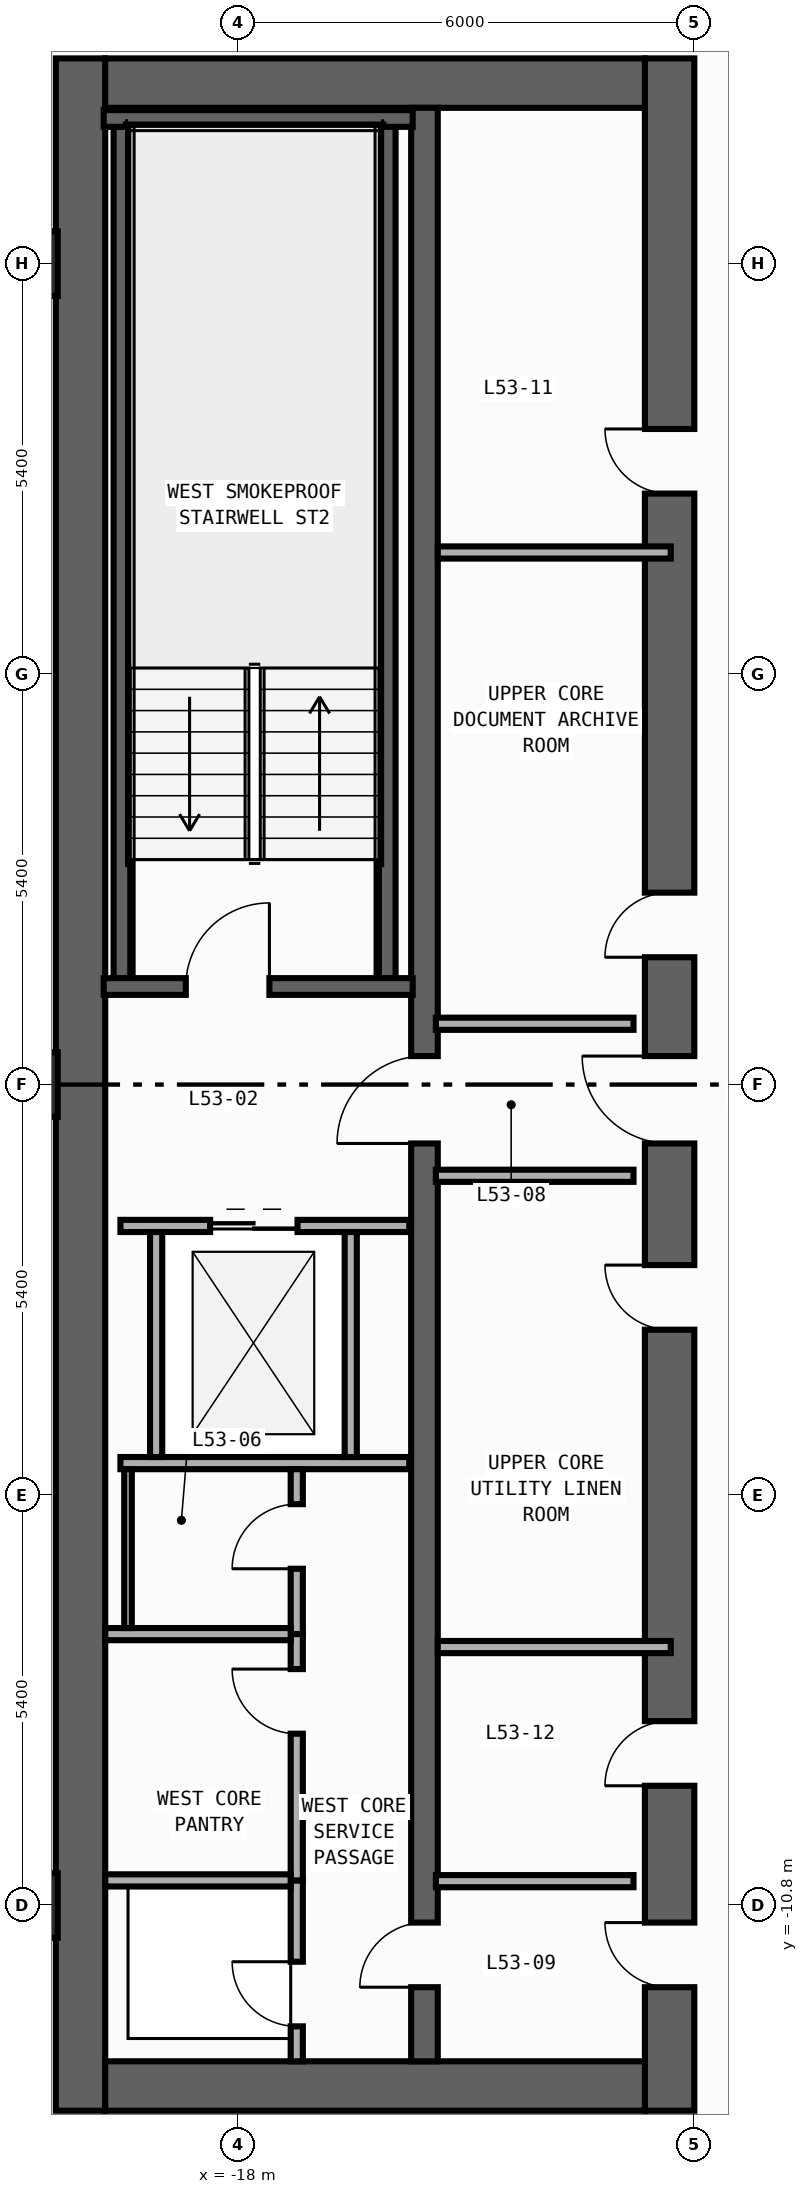
"""IFC4 building model, lengths in metres.
Left out: names, types, materials, properties, quantities, classifications, styles, units other than length and angle.
Written with IfcOpenShell. Run it as: python <this file> out.ifc"""

import sys

from ifc_helpers import new_model, si_unit, direction, frame, frame_2d, origin, origin_2d, place, context, subcontext, project, spatial, rectangle, extrude, element, fill, save


model = new_model("IFC4")
c1 = context("Model", 3, precision=1e-05, world=origin(), true_north=direction((0.0, 1.0)))
c2 = subcontext(c1, "Body", "Model", "MODEL_VIEW")
j1 = project(units=[si_unit("LENGTHUNIT", "METRE"), si_unit("PLANEANGLEUNIT", "RADIAN")], contexts=[c1])
p1 = place(None, origin())
s1 = spatial("IfcSite", under=j1, at=p1, CompositionType="ELEMENT")
p2 = place(p1, origin())
s2 = spatial("IfcBuilding", under=s1, at=p2, CompositionType="ELEMENT")
p3 = place(p2, frame((0.0, 0.0, 229.6)))
s3 = spatial("IfcBuildingStorey", under=s2, at=p3, CompositionType="ELEMENT", Elevation=229.6)
p4 = place(p3, frame((-20.075, -13.5, 0.0), z_axis=(0.0, 0.0, 1.0), x_axis=(0.0, 1.0, 0.0)))
e1 = element("IfcWall", 1, at=p4, inside=s3, PredefinedType="SHEAR", context=c2, shape_type="SweptSolid", body=[
    extrude(rectangle(XDim=27.0, YDim=0.65, at=frame_2d((13.5, 0.0))), origin(), (0.0, 0.0, 1.0), 3.34),
])
p5 = place(p3, frame((-12.325, -13.5, 0.0), z_axis=(0.0, 0.0, 1.0), x_axis=(0.0, 1.0, 0.0)))
e2 = element("IfcWall", 2, at=p5, inside=s3, PredefinedType="SHEAR", context=c2, shape_type="SweptSolid", body=[
    extrude(rectangle(XDim=27.0, YDim=0.65, at=frame_2d((13.5, 0.0))), origin(), (0.0, 0.0, 1.0), 3.34),
])
p6 = place(p5, frame((15.175, 0.0, 0.0)))
e3 = element("IfcOpeningElement", 3, at=p6, cuts=e2, PredefinedType="OPENING", context=c2, shape_type="SweptSolid", body=[
    extrude(rectangle(XDim=0.85, YDim=2.1, at=frame_2d((0.425, 1.05))), frame((0.0, 0.335, 0.0), z_axis=(0.0, -1.0, 0.0), x_axis=(1.0, 0.0, 0.0)), (0.0, 0.0, 1.0), 0.67),
])
p7 = place(p5, frame((21.275, 0.0, 0.0)))
e4 = element("IfcOpeningElement", 4, at=p7, cuts=e2, PredefinedType="OPENING", context=c2, shape_type="SweptSolid", body=[
    extrude(rectangle(XDim=0.85, YDim=2.1, at=frame_2d((0.425, 1.05))), frame((0.0, 0.335, 0.0), z_axis=(0.0, -1.0, 0.0), x_axis=(1.0, 0.0, 0.0)), (0.0, 0.0, 1.0), 0.67),
])
p8 = place(p5, frame((4.275, 0.0, 0.0)))
e5 = element("IfcOpeningElement", 5, at=p8, cuts=e2, PredefinedType="OPENING", context=c2, shape_type="SweptSolid", body=[
    extrude(rectangle(XDim=0.85, YDim=2.1, at=frame_2d((0.425, 1.05))), frame((0.0, 0.335, 0.0), z_axis=(0.0, -1.0, 0.0), x_axis=(1.0, 0.0, 0.0)), (0.0, 0.0, 1.0), 0.67),
])
p9 = place(p5, frame((10.275, 0.0, 0.0)))
e6 = element("IfcOpeningElement", 6, at=p9, cuts=e2, PredefinedType="OPENING", context=c2, shape_type="SweptSolid", body=[
    extrude(rectangle(XDim=0.85, YDim=2.1, at=frame_2d((0.425, 1.05))), frame((0.0, 0.335, 0.0), z_axis=(0.0, -1.0, 0.0), x_axis=(1.0, 0.0, 0.0)), (0.0, 0.0, 1.0), 0.67),
])
p10 = place(p5, frame((12.725, 0.0, 0.0)))
e7 = element("IfcOpeningElement", 7, at=p10, cuts=e2, PredefinedType="OPENING", context=c2, shape_type="SweptSolid", body=[
    extrude(rectangle(XDim=1.15, YDim=2.2, at=frame_2d((0.575, 1.1))), frame((0.0, 0.335, 0.0), z_axis=(0.0, -1.0, 0.0), x_axis=(1.0, 0.0, 0.0)), (0.0, 0.0, 1.0), 0.67),
])
p11 = place(p5, frame((1.625, 0.0, 0.0)))
e8 = element("IfcOpeningElement", 8, at=p11, cuts=e2, PredefinedType="OPENING", context=c2, shape_type="SweptSolid", body=[
    extrude(rectangle(XDim=0.85, YDim=2.1, at=frame_2d((0.425, 1.05))), frame((0.0, 0.335, 0.0), z_axis=(0.0, -1.0, 0.0), x_axis=(1.0, 0.0, 0.0)), (0.0, 0.0, 1.0), 0.67),
])
for number, where, z_axis, x_axis in (
    (9, (-19.75, -13.175, 0.0), (0.0, 0.0, 1.0), (1.0, 0.0, 0.0)),
    (10, (-19.75, 13.175, 0.0), (0.0, 0.0, 1.0), (1.0, 0.0, 0.0)),
):
    element("IfcWall", number, at=place(p3, frame(where, z_axis=z_axis, x_axis=x_axis)), inside=s3, PredefinedType="SHEAR", context=c2, shape_type="SweptSolid", body=[
        extrude(rectangle(XDim=7.1, YDim=0.65, at=frame_2d((3.55, 0.0))), origin(), (0.0, 0.0, 1.0), 3.34),
    ])
p12 = place(p3, frame((-15.55, -12.85, 0.0), z_axis=(0.0, 0.0, 1.0), x_axis=(0.0, 1.0, 0.0)))
e11 = element("IfcWall", 11, at=p12, inside=s3, PredefinedType="SHEAR", context=c2, shape_type="SweptSolid", body=[
    extrude(rectangle(XDim=25.7, YDim=0.35, at=frame_2d((12.85, 0.0))), origin(), (0.0, 0.0, 1.0), 3.34),
])
p13 = place(p12, frame((12.075, 0.0, 0.0)))
e12 = element("IfcOpeningElement", 12, at=p13, cuts=e11, PredefinedType="OPENING", context=c2, shape_type="SweptSolid", body=[
    extrude(rectangle(XDim=1.15, YDim=2.2, at=frame_2d((0.575, 1.1))), frame((0.0, 0.185, 0.0), z_axis=(0.0, -1.0, 0.0), x_axis=(1.0, 0.0, 0.0)), (0.0, 0.0, 1.0), 0.37),
])
p14 = place(p12, frame((0.975, 0.0, 0.0)))
e13 = element("IfcOpeningElement", 13, at=p14, cuts=e11, PredefinedType="OPENING", context=c2, shape_type="SweptSolid", body=[
    extrude(rectangle(XDim=0.85, YDim=2.1, at=frame_2d((0.425, 1.05))), frame((0.0, 0.185, 0.0), z_axis=(0.0, -1.0, 0.0), x_axis=(1.0, 0.0, 0.0)), (0.0, 0.0, 1.0), 0.37),
])
for number, where, z_axis, x_axis in (
    (14, (-16.04, 1.29, 0.0), (0.0, 0.0, 1.0), (0.0, 1.0, 0.0)),
    (15, (-19.53, 1.29, 0.0), (0.0, 0.0, 1.0), (0.0, 1.0, 0.0)),
):
    element("IfcWall", number, at=place(p3, frame(where, z_axis=z_axis, x_axis=x_axis)), inside=s3, PredefinedType="SHEAR", context=c2, shape_type="SweptSolid", body=[
        extrude(rectangle(XDim=11.42, YDim=0.22, at=frame_2d((5.71, 0.0))), origin(), (0.0, 0.0, 1.0), 3.34),
    ])
p15 = place(p3, frame((-19.77, 12.71, 0.0), z_axis=(0.0, 0.0, 1.0), x_axis=(1.0, 0.0, 0.0)))
e16 = element("IfcWall", 16, at=p15, inside=s3, PredefinedType="SHEAR", context=c2, shape_type="SweptSolid", body=[
    extrude(rectangle(XDim=4.065, YDim=0.22, at=frame_2d((2.032, 0.0))), origin(), (0.0, 0.0, 1.0), 3.34),
])
p16 = place(p3, frame((-19.77, 1.29, 0.0), z_axis=(0.0, 0.0, 1.0), x_axis=(1.0, 0.0, 0.0)))
e17 = element("IfcWall", 17, at=p16, inside=s3, PredefinedType="SHEAR", context=c2, shape_type="SweptSolid", body=[
    extrude(rectangle(XDim=4.065, YDim=0.22, at=frame_2d((2.032, 0.0))), origin(), (0.0, 0.0, 1.0), 3.34),
])
p17 = place(p16, frame((1.08, 0.0, 0.0)))
e18 = element("IfcOpeningElement", 18, at=p17, cuts=e17, PredefinedType="OPENING", context=c2, shape_type="SweptSolid", body=[
    extrude(rectangle(XDim=1.1, YDim=2.2, at=frame_2d((0.55, 1.1))), frame((0.0, 0.12, 0.0), z_axis=(0.0, -1.0, 0.0), x_axis=(1.0, 0.0, 0.0)), (0.0, 0.0, 1.0), 0.24),
])
for number, where, z_axis, x_axis in (
    (19, (-20.8, -10.8, 0.0), (0.0, 0.0, 1.0), (1.0, 0.0, 0.0)),
    (20, (-20.8, 0.0, 0.0), (0.0, 0.0, 1.0), (1.0, 0.0, 0.0)),
    (21, (-20.8, 10.8, 0.0), (0.0, 0.0, 1.0), (1.0, 0.0, 0.0)),
):
    element("IfcColumn", number, at=place(p3, frame(where, z_axis=z_axis, x_axis=x_axis)), inside=s3, PredefinedType="COLUMN", context=c2, shape_type="SweptSolid", body=[
        extrude(rectangle(XDim=0.85, YDim=0.85, at=origin_2d()), origin(), (0.0, 0.0, 1.0), 3.6),
    ])
p18 = place(p3, frame((-19.55, -1.86, 0.0), z_axis=(0.0, 0.0, 1.0), x_axis=(1.0, 0.0, 0.0)))
e22 = element("IfcWall", 22, at=p18, inside=s3, PredefinedType="STANDARD", context=c2, shape_type="SweptSolid", body=[
    extrude(rectangle(XDim=3.8, YDim=0.16, at=frame_2d((1.9, 0.0))), origin(), (0.0, 0.0, 1.0), 3.34),
])
p19 = place(p18, frame((1.18, 0.0, 0.0)))
e23 = element("IfcOpeningElement", 23, at=p19, cuts=e22, PredefinedType="OPENING", context=c2, shape_type="SweptSolid", body=[
    extrude(rectangle(XDim=1.15, YDim=2.2, at=frame_2d((0.575, 1.1))), frame((0.0, 0.09, 0.0), z_axis=(0.0, -1.0, 0.0), x_axis=(1.0, 0.0, 0.0)), (0.0, 0.0, 1.0), 0.18),
])
p20 = place(p3, frame((-19.55, -4.98, 0.0), z_axis=(0.0, 0.0, 1.0), x_axis=(1.0, 0.0, 0.0)))
e24 = element("IfcWall", 24, at=p20, inside=s3, PredefinedType="STANDARD", context=c2, shape_type="SweptSolid", body=[
    extrude(rectangle(XDim=3.8, YDim=0.16, at=frame_2d((1.9, 0.0))), origin(), (0.0, 0.0, 1.0), 3.34),
])
for number, where, z_axis, x_axis in (
    (25, (-19.08, -4.9, 0.0), (0.0, 0.0, 1.0), (0.0, 1.0, 0.0)),
    (26, (-16.52, -4.9, 0.0), (0.0, 0.0, 1.0), (0.0, 1.0, 0.0)),
):
    element("IfcWall", number, at=place(p3, frame(where, z_axis=z_axis, x_axis=x_axis)), inside=s3, PredefinedType="STANDARD", context=c2, shape_type="SweptSolid", body=[
        extrude(rectangle(XDim=2.96, YDim=0.16, at=frame_2d((1.48, 0.0))), origin(), (0.0, 0.0, 1.0), 3.34),
    ])
for number, where, z_axis, x_axis in (
    (27, (-15.4, 0.8, 0.0), (0.0, 0.0, 1.0), (1.0, 0.0, 0.0)),
    (28, (-15.4, -1.2, 0.0), (0.0, 0.0, 1.0), (1.0, 0.0, 0.0)),
    (29, (-15.4, -10.48, 0.0), (0.0, 0.0, 1.0), (1.0, 0.0, 0.0)),
):
    element("IfcWall", number, at=place(p3, frame(where, z_axis=z_axis, x_axis=x_axis)), inside=s3, PredefinedType="STANDARD", context=c2, shape_type="SweptSolid", body=[
        extrude(rectangle(XDim=2.6, YDim=0.16, at=frame_2d((1.3, 0.0))), origin(), (0.0, 0.0, 1.0), 3.34),
    ])
p21 = place(p3, frame((-17.23, -12.85, 0.0), z_axis=(0.0, 0.0, 1.0), x_axis=(0.0, 1.0, 0.0)))
e30 = element("IfcWall", 30, at=p21, inside=s3, PredefinedType="PARTITIONING", context=c2, shape_type="SweptSolid", body=[
    extrude(rectangle(XDim=2.38, YDim=0.16, at=frame_2d((1.19, 0.0))), origin(), (0.0, 0.0, 1.0), 3.34),
])
p22 = place(p21, frame((0.46, 0.0, 0.0)))
e31 = element("IfcOpeningElement", 31, at=p22, cuts=e30, PredefinedType="OPENING", context=c2, shape_type="SweptSolid", body=[
    extrude(rectangle(XDim=0.85, YDim=2.1, at=frame_2d((0.425, 1.05))), frame((0.0, 0.09, 0.0), z_axis=(0.0, -1.0, 0.0), x_axis=(1.0, 0.0, 0.0)), (0.0, 0.0, 1.0), 0.18),
])
p23 = place(p3, frame((-17.23, -7.23, 0.0), z_axis=(0.0, 0.0, 1.0), x_axis=(0.0, 1.0, 0.0)))
e32 = element("IfcWall", 32, at=p23, inside=s3, PredefinedType="PARTITIONING", context=c2, shape_type="SweptSolid", body=[
    extrude(rectangle(XDim=2.17, YDim=0.16, at=frame_2d((1.085, 0.0))), origin(), (0.0, 0.0, 1.0), 3.34),
])
p24 = place(p23, frame((0.86, 0.0, 0.0)))
e33 = element("IfcOpeningElement", 33, at=p24, cuts=e32, PredefinedType="OPENING", context=c2, shape_type="SweptSolid", body=[
    extrude(rectangle(XDim=0.85, YDim=2.1, at=frame_2d((0.425, 1.05))), frame((0.0, 0.09, 0.0), z_axis=(0.0, -1.0, 0.0), x_axis=(1.0, 0.0, 0.0)), (0.0, 0.0, 1.0), 0.18),
])
p25 = place(p3, frame((-17.23, -10.47, 0.0), z_axis=(0.0, 0.0, 1.0), x_axis=(0.0, 1.0, 0.0)))
e34 = element("IfcWall", 34, at=p25, inside=s3, PredefinedType="PARTITIONING", context=c2, shape_type="SweptSolid", body=[
    extrude(rectangle(XDim=3.24, YDim=0.16, at=frame_2d((1.62, 0.0))), origin(), (0.0, 0.0, 1.0), 3.34),
])
p26 = place(p25, frame((1.93, 0.0, 0.0)))
e35 = element("IfcOpeningElement", 35, at=p26, cuts=e34, PredefinedType="OPENING", context=c2, shape_type="SweptSolid", body=[
    extrude(rectangle(XDim=0.85, YDim=2.1, at=frame_2d((0.425, 1.05))), frame((0.0, 0.09, 0.0), z_axis=(0.0, -1.0, 0.0), x_axis=(1.0, 0.0, 0.0)), (0.0, 0.0, 1.0), 0.18),
])
for number, where, z_axis, x_axis in (
    (36, (-19.75, -10.47, 0.0), (0.0, 0.0, 1.0), (1.0, 0.0, 0.0)),
    (37, (-19.75, -7.23, 0.0), (0.0, 0.0, 1.0), (1.0, 0.0, 0.0)),
):
    element("IfcWall", number, at=place(p3, frame(where, z_axis=z_axis, x_axis=x_axis)), inside=s3, PredefinedType="PARTITIONING", context=c2, shape_type="SweptSolid", body=[
        extrude(rectangle(XDim=2.44, YDim=0.16, at=frame_2d((1.22, 0.0))), origin(), (0.0, 0.0, 1.0), 3.34),
    ])
for number, where, z_axis, x_axis in (
    (38, (-15.375, 7.0, 0.0), (0.0, 0.0, 1.0), (1.0, 0.0, 0.0)),
    (39, (-15.375, -7.4, 0.0), (0.0, 0.0, 1.0), (1.0, 0.0, 0.0)),
):
    element("IfcWall", number, at=place(p3, frame(where, z_axis=z_axis, x_axis=x_axis)), inside=s3, PredefinedType="PARTITIONING", context=c2, shape_type="SweptSolid", body=[
        extrude(rectangle(XDim=3.065, YDim=0.16, at=frame_2d((1.532, 0.0))), origin(), (0.0, 0.0, 1.0), 3.34),
    ])
p27 = place(p3, frame((-19.45, -7.15, 0.0), z_axis=(0.0, 0.0, 1.0), x_axis=(0.0, 1.0, 0.0)))
e40 = element("IfcWall", 40, at=p27, inside=s3, PredefinedType="PARTITIONING", context=c2, shape_type="SweptSolid", body=[
    extrude(rectangle(XDim=2.09, YDim=0.1, at=frame_2d((1.045, 0.0))), origin(), (0.0, 0.0, 1.0), 3.34),
])
p28 = place(p17, origin())
e41 = element("IfcDoor", 41, at=p28, inside=s3, OperationType="SINGLE_SWING_RIGHT", PredefinedType="DOOR", context=c2, shape_type="SweptSolid", body=[
    extrude(rectangle(XDim=1.1, YDim=2.2, at=frame_2d((0.55, 1.1))), frame((0.0, 0.025, 0.0), z_axis=(0.0, -1.0, 0.0), x_axis=(1.0, 0.0, 0.0)), (0.0, 0.0, 1.0), 0.05),
])
fill(e18, e41)
p29 = place(p6, origin())
e42 = element("IfcDoor", 42, at=p29, inside=s3, OperationType="SINGLE_SWING_LEFT", PredefinedType="DOOR", context=c2, shape_type="SweptSolid", body=[
    extrude(rectangle(XDim=0.85, YDim=2.1, at=frame_2d((0.425, 1.05))), frame((0.0, 0.025, 0.0), z_axis=(0.0, -1.0, 0.0), x_axis=(1.0, 0.0, 0.0)), (0.0, 0.0, 1.0), 0.05),
])
fill(e3, e42)
p30 = place(p7, origin())
e43 = element("IfcDoor", 43, at=p30, inside=s3, OperationType="SINGLE_SWING_RIGHT", PredefinedType="DOOR", context=c2, shape_type="SweptSolid", body=[
    extrude(rectangle(XDim=0.85, YDim=2.1, at=frame_2d((0.425, 1.05))), frame((0.0, 0.025, 0.0), z_axis=(0.0, -1.0, 0.0), x_axis=(1.0, 0.0, 0.0)), (0.0, 0.0, 1.0), 0.05),
])
fill(e4, e43)
p31 = place(p8, origin())
e44 = element("IfcDoor", 44, at=p31, inside=s3, OperationType="SINGLE_SWING_LEFT", PredefinedType="DOOR", context=c2, shape_type="SweptSolid", body=[
    extrude(rectangle(XDim=0.85, YDim=2.1, at=frame_2d((0.425, 1.05))), frame((0.0, 0.025, 0.0), z_axis=(0.0, -1.0, 0.0), x_axis=(1.0, 0.0, 0.0)), (0.0, 0.0, 1.0), 0.05),
])
fill(e5, e44)
p32 = place(p9, origin())
e45 = element("IfcDoor", 45, at=p32, inside=s3, OperationType="SINGLE_SWING_RIGHT", PredefinedType="DOOR", context=c2, shape_type="SweptSolid", body=[
    extrude(rectangle(XDim=0.85, YDim=2.1, at=frame_2d((0.425, 1.05))), frame((0.0, 0.025, 0.0), z_axis=(0.0, -1.0, 0.0), x_axis=(1.0, 0.0, 0.0)), (0.0, 0.0, 1.0), 0.05),
])
fill(e6, e45)
p33 = place(p10, origin())
e46 = element("IfcDoor", 46, at=p33, inside=s3, OperationType="SINGLE_SWING_RIGHT", PredefinedType="DOOR", context=c2, shape_type="SweptSolid", body=[
    extrude(rectangle(XDim=1.15, YDim=2.2, at=frame_2d((0.575, 1.1))), frame((0.0, 0.025, 0.0), z_axis=(0.0, -1.0, 0.0), x_axis=(1.0, 0.0, 0.0)), (0.0, 0.0, 1.0), 0.05),
])
fill(e7, e46)
p34 = place(p13, origin())
e47 = element("IfcDoor", 47, at=p34, inside=s3, OperationType="SINGLE_SWING_LEFT", PredefinedType="DOOR", context=c2, shape_type="SweptSolid", body=[
    extrude(rectangle(XDim=1.15, YDim=2.2, at=frame_2d((0.575, 1.1))), frame((0.0, 0.025, 0.0), z_axis=(0.0, -1.0, 0.0), x_axis=(1.0, 0.0, 0.0)), (0.0, 0.0, 1.0), 0.05),
])
fill(e12, e47)
p35 = place(p11, origin())
e48 = element("IfcDoor", 48, at=p35, inside=s3, OperationType="SINGLE_SWING_RIGHT", PredefinedType="DOOR", context=c2, shape_type="SweptSolid", body=[
    extrude(rectangle(XDim=0.85, YDim=2.1, at=frame_2d((0.425, 1.05))), frame((0.0, 0.025, 0.0), z_axis=(0.0, -1.0, 0.0), x_axis=(1.0, 0.0, 0.0)), (0.0, 0.0, 1.0), 0.05),
])
fill(e8, e48)
p36 = place(p14, origin())
e49 = element("IfcDoor", 49, at=p36, inside=s3, OperationType="SINGLE_SWING_LEFT", PredefinedType="DOOR", context=c2, shape_type="SweptSolid", body=[
    extrude(rectangle(XDim=0.85, YDim=2.1, at=frame_2d((0.425, 1.05))), frame((0.0, 0.025, 0.0), z_axis=(0.0, -1.0, 0.0), x_axis=(1.0, 0.0, 0.0)), (0.0, 0.0, 1.0), 0.05),
])
fill(e13, e49)
p37 = place(p19, origin())
e50 = element("IfcDoor", 50, at=p37, inside=s3, OperationType="DOUBLE_DOOR_SLIDING", PredefinedType="DOOR", context=c2, shape_type="SweptSolid", body=[
    extrude(rectangle(XDim=1.15, YDim=2.2, at=frame_2d((0.575, 1.1))), frame((0.0, 0.025, 0.0), z_axis=(0.0, -1.0, 0.0), x_axis=(1.0, 0.0, 0.0)), (0.0, 0.0, 1.0), 0.05),
])
fill(e23, e50)
p38 = place(p22, origin())
e51 = element("IfcDoor", 51, at=p38, inside=s3, OperationType="SINGLE_SWING_RIGHT", PredefinedType="DOOR", context=c2, shape_type="SweptSolid", body=[
    extrude(rectangle(XDim=0.85, YDim=2.1, at=frame_2d((0.425, 1.05))), frame((0.0, 0.025, 0.0), z_axis=(0.0, -1.0, 0.0), x_axis=(1.0, 0.0, 0.0)), (0.0, 0.0, 1.0), 0.05),
])
fill(e31, e51)
p39 = place(p24, origin())
e52 = element("IfcDoor", 52, at=p39, inside=s3, OperationType="SINGLE_SWING_LEFT", PredefinedType="DOOR", context=c2, shape_type="SweptSolid", body=[
    extrude(rectangle(XDim=0.85, YDim=2.1, at=frame_2d((0.425, 1.05))), frame((0.0, 0.025, 0.0), z_axis=(0.0, -1.0, 0.0), x_axis=(1.0, 0.0, 0.0)), (0.0, 0.0, 1.0), 0.05),
])
fill(e33, e52)
p40 = place(p26, origin())
e53 = element("IfcDoor", 53, at=p40, inside=s3, OperationType="SINGLE_SWING_RIGHT", PredefinedType="DOOR", context=c2, shape_type="SweptSolid", body=[
    extrude(rectangle(XDim=0.85, YDim=2.1, at=frame_2d((0.425, 1.05))), frame((0.0, 0.025, 0.0), z_axis=(0.0, -1.0, 0.0), x_axis=(1.0, 0.0, 0.0)), (0.0, 0.0, 1.0), 0.05),
])
fill(e35, e53)
save(model, sys.argv[1])
